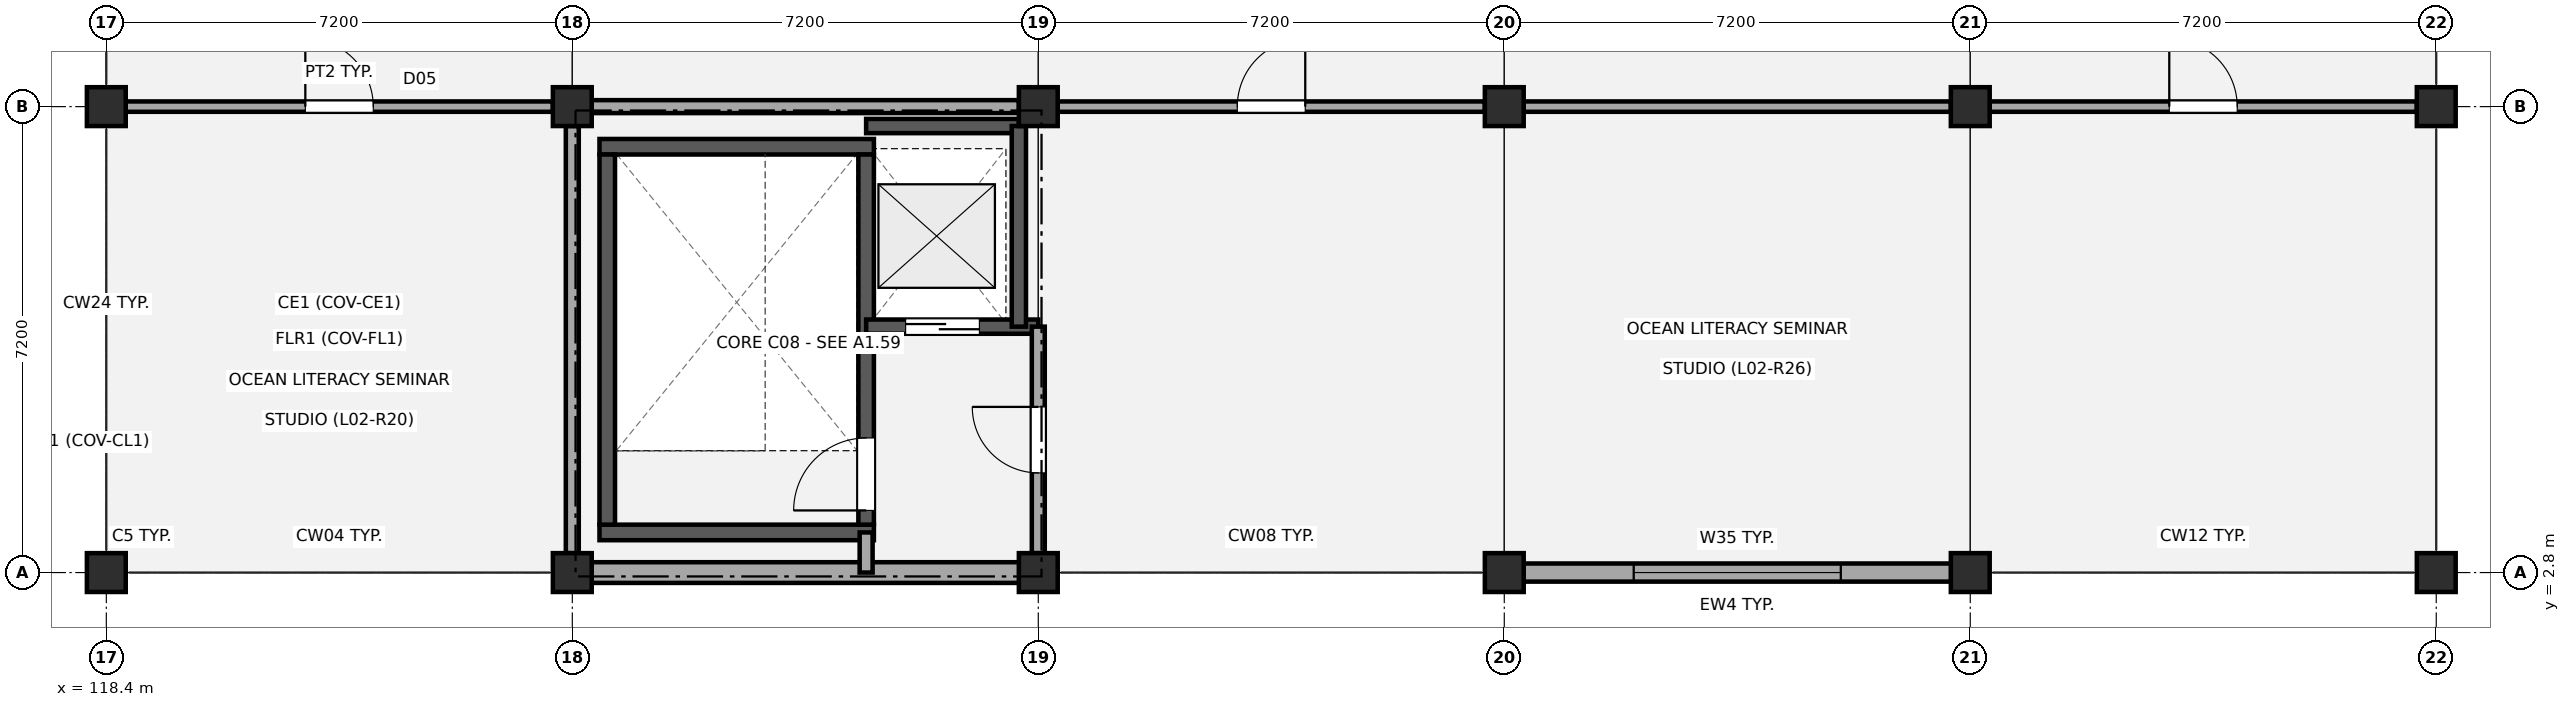
"""IFC4 building model, lengths in metres.
Left out: names, types, materials, properties, quantities, classifications, styles, units other than length and angle.
Written with IfcOpenShell. Run it as: python <this file> out.ifc"""

import sys

from ifc_helpers import new_model, si_unit, direction, frame, frame_2d, origin, origin_2d, place, context, subcontext, project, spatial, rectangle, extrude, element, fill, save


model = new_model("IFC4")
c1 = context("Model", 3, precision=1e-05, world=origin(), true_north=direction((0.0, 1.0)))
c2 = subcontext(c1, "Body", "Model", "MODEL_VIEW")
j1 = project(units=[si_unit("LENGTHUNIT", "METRE"), si_unit("PLANEANGLEUNIT", "RADIAN")], contexts=[c1])
p1 = place(None, origin())
s1 = spatial("IfcSite", under=j1, at=p1, CompositionType="ELEMENT")
p2 = place(p1, origin())
s2 = spatial("IfcBuilding", under=s1, at=p2, CompositionType="ELEMENT")
p3 = place(p2, frame((0.0, 0.0, 9.18)))
s3 = spatial("IfcBuildingStorey", under=s2, at=p3, CompositionType="ELEMENT", Elevation=9.18)
for number, where, z_axis, x_axis in (
    (1, (118.4, 2.8, 0.0), (0.0, 0.0, 1.0), (1.0, 0.0, 0.0)),
    (2, (118.4, 10.0, 0.0), (0.0, 0.0, 1.0), (1.0, 0.0, 0.0)),
    (3, (125.6, 2.8, 0.0), (0.0, 0.0, 1.0), (1.0, 0.0, 0.0)),
    (4, (125.6, 10.0, 0.0), (0.0, 0.0, 1.0), (1.0, 0.0, 0.0)),
    (5, (132.8, 2.8, 0.0), (0.0, 0.0, 1.0), (1.0, 0.0, 0.0)),
    (6, (132.8, 10.0, 0.0), (0.0, 0.0, 1.0), (1.0, 0.0, 0.0)),
    (7, (140.0, 2.8, 0.0), (0.0, 0.0, 1.0), (1.0, 0.0, 0.0)),
    (8, (140.0, 10.0, 0.0), (0.0, 0.0, 1.0), (1.0, 0.0, 0.0)),
    (9, (147.2, 2.8, 0.0), (0.0, 0.0, 1.0), (1.0, 0.0, 0.0)),
    (10, (147.2, 10.0, 0.0), (0.0, 0.0, 1.0), (1.0, 0.0, 0.0)),
    (11, (154.4, 2.8, 0.0), (0.0, 0.0, 1.0), (1.0, 0.0, 0.0)),
    (12, (154.4, 10.0, 0.0), (0.0, 0.0, 1.0), (1.0, 0.0, 0.0)),
):
    element("IfcColumn", number, at=place(p3, frame(where, z_axis=z_axis, x_axis=x_axis)), inside=s3, PredefinedType="COLUMN", context=c2, shape_type="SweptSolid", body=[
        extrude(rectangle(XDim=0.6, YDim=0.6, at=origin_2d()), origin(), (0.0, 0.0, 1.0), 4.32),
    ])
p4 = place(p3, frame((132.505, 2.8, 0.0), z_axis=(0.0, 0.0, 1.0), x_axis=(-1.0, 0.0, 0.0)))
e13 = element("IfcWall", 13, at=p4, inside=s3, PredefinedType="STANDARD", context=c2, shape_type="SweptSolid", body=[
    extrude(rectangle(XDim=6.61, YDim=0.32, at=frame_2d((3.305, 0.0))), origin(), (0.0, 0.0, 1.0), 3.52),
])
p5 = place(p3, frame((146.905, 2.8, 0.0), z_axis=(0.0, 0.0, 1.0), x_axis=(-1.0, 0.0, 0.0)))
e14 = element("IfcWall", 14, at=p5, inside=s3, PredefinedType="STANDARD", context=c2, shape_type="SweptSolid", body=[
    extrude(rectangle(XDim=6.61, YDim=0.28, at=frame_2d((3.305, 0.0))), origin(), (0.0, 0.0, 1.0), 3.52),
])
p6 = place(p5, frame((1.705, 0.0, 0.95)))
e15 = element("IfcOpeningElement", 15, at=p6, cuts=e14, PredefinedType="OPENING", context=c2, shape_type="SweptSolid", body=[
    extrude(rectangle(XDim=3.2, YDim=1.5, at=frame_2d((1.6, 0.75))), frame((0.0, 0.15, 0.0), z_axis=(0.0, -1.0, 0.0), x_axis=(1.0, 0.0, 0.0)), (0.0, 0.0, 1.0), 0.3),
])
for number, where, z_axis, x_axis in (
    (16, (126.02, 3.42, 0.0), (0.0, 0.0, 1.0), (1.0, 0.0, 0.0)),
    (17, (126.02, 9.38, 0.0), (0.0, 0.0, 1.0), (1.0, 0.0, 0.0)),
):
    element("IfcWall", number, at=place(p3, frame(where, z_axis=z_axis, x_axis=x_axis)), inside=s3, PredefinedType="SHEAR", context=c2, shape_type="SweptSolid", body=[
        extrude(rectangle(XDim=4.24, YDim=0.24, at=frame_2d((2.12, 0.0))), origin(), (0.0, 0.0, 1.0), 4.08),
    ])
p7 = place(p3, frame((126.14, 3.54, 0.0), z_axis=(0.0, 0.0, 1.0), x_axis=(0.0, 1.0, 0.0)))
e18 = element("IfcWall", 18, at=p7, inside=s3, PredefinedType="SHEAR", context=c2, shape_type="SweptSolid", body=[
    extrude(rectangle(XDim=5.72, YDim=0.24, at=frame_2d((2.86, 0.0))), origin(), (0.0, 0.0, 1.0), 4.08),
])
p8 = place(p3, frame((130.14, 3.54, 0.0), z_axis=(0.0, 0.0, 1.0), x_axis=(0.0, 1.0, 0.0)))
e19 = element("IfcWall", 19, at=p8, inside=s3, PredefinedType="SHEAR", context=c2, shape_type="SweptSolid", body=[
    extrude(rectangle(XDim=5.72, YDim=0.24, at=frame_2d((2.86, 0.0))), origin(), (0.0, 0.0, 1.0), 4.08),
])
p9 = place(p8, frame((0.22, 0.0, 0.0)))
e20 = element("IfcOpeningElement", 20, at=p9, cuts=e19, PredefinedType="OPENING", context=c2, shape_type="SweptSolid", body=[
    extrude(rectangle(XDim=1.12, YDim=2.15, at=frame_2d((0.56, 1.075))), frame((0.0, 0.13, 0.0), z_axis=(0.0, -1.0, 0.0), x_axis=(1.0, 0.0, 0.0)), (0.0, 0.0, 1.0), 0.26),
])
p10 = place(p3, frame((130.14, 6.6, 0.0), z_axis=(0.0, 0.0, 1.0), x_axis=(1.0, 0.0, 0.0)))
e21 = element("IfcWall", 21, at=p10, inside=s3, PredefinedType="SHEAR", context=c2, shape_type="SweptSolid", body=[
    extrude(rectangle(XDim=2.66, YDim=0.22, at=frame_2d((1.33, 0.0))), origin(), (0.0, 0.0, 1.0), 4.08),
])
p11 = place(p10, frame((0.61, 0.0, 0.0)))
e22 = element("IfcOpeningElement", 22, at=p11, cuts=e21, PredefinedType="OPENING", context=c2, shape_type="SweptSolid", body=[
    extrude(rectangle(XDim=1.14, YDim=2.15, at=frame_2d((0.57, 1.075))), frame((0.0, 0.12, 0.0), z_axis=(0.0, -1.0, 0.0), x_axis=(1.0, 0.0, 0.0)), (0.0, 0.0, 1.0), 0.24),
])
p12 = place(p3, frame((130.14, 9.7, 0.0), z_axis=(0.0, 0.0, 1.0), x_axis=(1.0, 0.0, 0.0)))
e23 = element("IfcWall", 23, at=p12, inside=s3, PredefinedType="SHEAR", context=c2, shape_type="SweptSolid", body=[
    extrude(rectangle(XDim=2.36, YDim=0.22, at=frame_2d((1.18, 0.0))), origin(), (0.0, 0.0, 1.0), 4.08),
])
p13 = place(p3, frame((132.5, 6.6, 0.0), z_axis=(0.0, 0.0, 1.0), x_axis=(0.0, 1.0, 0.0)))
e24 = element("IfcWall", 24, at=p13, inside=s3, PredefinedType="SHEAR", context=c2, shape_type="SweptSolid", body=[
    extrude(rectangle(XDim=3.1, YDim=0.22, at=frame_2d((1.55, 0.0))), origin(), (0.0, 0.0, 1.0), 4.08),
])
p14 = place(p3, frame((130.14, 2.8, 0.0), z_axis=(0.0, 0.0, 1.0), x_axis=(0.0, 1.0, 0.0)))
e25 = element("IfcWall", 25, at=p14, inside=s3, PredefinedType="PARTITIONING", context=c2, shape_type="SweptSolid", body=[
    extrude(rectangle(XDim=0.62, YDim=0.2, at=frame_2d((0.31, 0.0))), origin(), (0.0, 0.0, 1.0), 3.52),
])
p15 = place(p3, frame((125.6, 3.1, 0.0), z_axis=(0.0, 0.0, 1.0), x_axis=(0.0, 1.0, 0.0)))
e26 = element("IfcWall", 26, at=p15, inside=s3, PredefinedType="PARTITIONING", context=c2, shape_type="SweptSolid", body=[
    extrude(rectangle(XDim=6.6, YDim=0.2, at=frame_2d((3.3, 0.0))), origin(), (0.0, 0.0, 1.0), 3.42),
])
p16 = place(p3, frame((132.8, 3.1, 0.0), z_axis=(0.0, 0.0, 1.0), x_axis=(0.0, 1.0, 0.0)))
e27 = element("IfcWall", 27, at=p16, inside=s3, PredefinedType="PARTITIONING", context=c2, shape_type="SweptSolid", body=[
    extrude(rectangle(XDim=3.5, YDim=0.2, at=frame_2d((1.75, 0.0))), origin(), (0.0, 0.0, 1.0), 3.42),
])
p17 = place(p16, frame((1.24, 0.0, 0.0)))
e28 = element("IfcOpeningElement", 28, at=p17, cuts=e27, PredefinedType="OPENING", context=c2, shape_type="SweptSolid", body=[
    extrude(rectangle(XDim=1.02, YDim=2.15, at=frame_2d((0.51, 1.075))), frame((0.0, 0.11, 0.0), z_axis=(0.0, -1.0, 0.0), x_axis=(1.0, 0.0, 0.0)), (0.0, 0.0, 1.0), 0.22),
])
p18 = place(p3, frame((125.9, 10.0, 0.0), z_axis=(0.0, 0.0, 1.0), x_axis=(1.0, 0.0, 0.0)))
e29 = element("IfcWall", 29, at=p18, inside=s3, PredefinedType="PARTITIONING", context=c2, shape_type="SweptSolid", body=[
    extrude(rectangle(XDim=6.6, YDim=0.2, at=frame_2d((3.3, 0.0))), origin(), (0.0, 0.0, 1.0), 3.42),
])
p19 = place(p3, frame((118.7, 10.0, 0.0), z_axis=(0.0, 0.0, 1.0), x_axis=(1.0, 0.0, 0.0)))
e30 = element("IfcWall", 30, at=p19, inside=s3, PredefinedType="PARTITIONING", context=c2, shape_type="SweptSolid", body=[
    extrude(rectangle(XDim=6.6, YDim=0.16, at=frame_2d((3.3, 0.0))), origin(), (0.0, 0.0, 1.0), 3.47),
])
p20 = place(p19, frame((2.775, 0.0, 0.0)))
e31 = element("IfcOpeningElement", 31, at=p20, cuts=e30, PredefinedType="OPENING", context=c2, shape_type="SweptSolid", body=[
    extrude(rectangle(XDim=1.05, YDim=2.14, at=frame_2d((0.525, 1.07))), frame((0.0, 0.09, 0.0), z_axis=(0.0, -1.0, 0.0), x_axis=(1.0, 0.0, 0.0)), (0.0, 0.0, 1.0), 0.18),
])
p21 = place(p3, frame((133.1, 10.0, 0.0), z_axis=(0.0, 0.0, 1.0), x_axis=(1.0, 0.0, 0.0)))
e32 = element("IfcWall", 32, at=p21, inside=s3, PredefinedType="PARTITIONING", context=c2, shape_type="SweptSolid", body=[
    extrude(rectangle(XDim=6.6, YDim=0.16, at=frame_2d((3.3, 0.0))), origin(), (0.0, 0.0, 1.0), 3.47),
])
p22 = place(p21, frame((2.775, 0.0, 0.0)))
e33 = element("IfcOpeningElement", 33, at=p22, cuts=e32, PredefinedType="OPENING", context=c2, shape_type="SweptSolid", body=[
    extrude(rectangle(XDim=1.05, YDim=2.14, at=frame_2d((0.525, 1.07))), frame((0.0, 0.09, 0.0), z_axis=(0.0, -1.0, 0.0), x_axis=(1.0, 0.0, 0.0)), (0.0, 0.0, 1.0), 0.18),
])
p23 = place(p3, frame((140.3, 10.0, 0.0), z_axis=(0.0, 0.0, 1.0), x_axis=(1.0, 0.0, 0.0)))
e34 = element("IfcWall", 34, at=p23, inside=s3, PredefinedType="PARTITIONING", context=c2, shape_type="SweptSolid", body=[
    extrude(rectangle(XDim=6.6, YDim=0.16, at=frame_2d((3.3, 0.0))), origin(), (0.0, 0.0, 1.0), 3.42),
])
p24 = place(p3, frame((147.5, 10.0, 0.0), z_axis=(0.0, 0.0, 1.0), x_axis=(1.0, 0.0, 0.0)))
e35 = element("IfcWall", 35, at=p24, inside=s3, PredefinedType="PARTITIONING", context=c2, shape_type="SweptSolid", body=[
    extrude(rectangle(XDim=6.6, YDim=0.16, at=frame_2d((3.3, 0.0))), origin(), (0.0, 0.0, 1.0), 3.47),
])
p25 = place(p24, frame((2.775, 0.0, 0.0)))
e36 = element("IfcOpeningElement", 36, at=p25, cuts=e35, PredefinedType="OPENING", context=c2, shape_type="SweptSolid", body=[
    extrude(rectangle(XDim=1.05, YDim=2.14, at=frame_2d((0.525, 1.07))), frame((0.0, 0.09, 0.0), z_axis=(0.0, -1.0, 0.0), x_axis=(1.0, 0.0, 0.0)), (0.0, 0.0, 1.0), 0.18),
])
p26 = place(p6, origin())
e37 = element("IfcWindow", 37, at=p26, inside=s3, PartitioningType="SINGLE_PANEL", PredefinedType="WINDOW", context=c2, shape_type="SweptSolid", body=[
    extrude(rectangle(XDim=3.2, YDim=1.5, at=frame_2d((1.6, 0.75))), frame((0.0, 0.03, 0.0), z_axis=(0.0, -1.0, 0.0), x_axis=(1.0, 0.0, 0.0)), (0.0, 0.0, 1.0), 0.06),
])
fill(e15, e37)
p27 = place(p9, origin())
e38 = element("IfcDoor", 38, at=p27, inside=s3, OperationType="SINGLE_SWING_LEFT", PredefinedType="DOOR", context=c2, shape_type="SweptSolid", body=[
    extrude(rectangle(XDim=1.12, YDim=2.15, at=frame_2d((0.56, 1.075))), frame((0.0, 0.025, 0.0), z_axis=(0.0, -1.0, 0.0), x_axis=(1.0, 0.0, 0.0)), (0.0, 0.0, 1.0), 0.05),
])
fill(e20, e38)
p28 = place(p11, origin())
e39 = element("IfcDoor", 39, at=p28, inside=s3, OperationType="SLIDING_TO_LEFT", PredefinedType="DOOR", context=c2, shape_type="SweptSolid", body=[
    extrude(rectangle(XDim=1.14, YDim=2.15, at=frame_2d((0.57, 1.075))), frame((0.0, 0.025, 0.0), z_axis=(0.0, -1.0, 0.0), x_axis=(1.0, 0.0, 0.0)), (0.0, 0.0, 1.0), 0.05),
])
fill(e22, e39)
p29 = place(p17, origin())
e40 = element("IfcDoor", 40, at=p29, inside=s3, OperationType="SINGLE_SWING_RIGHT", PredefinedType="DOOR", context=c2, shape_type="SweptSolid", body=[
    extrude(rectangle(XDim=1.02, YDim=2.15, at=frame_2d((0.51, 1.075))), frame((0.0, 0.025, 0.0), z_axis=(0.0, -1.0, 0.0), x_axis=(1.0, 0.0, 0.0)), (0.0, 0.0, 1.0), 0.05),
])
fill(e28, e40)
p30 = place(p20, origin())
e41 = element("IfcDoor", 41, at=p30, inside=s3, OperationType="SINGLE_SWING_LEFT", PredefinedType="DOOR", context=c2, shape_type="SweptSolid", body=[
    extrude(rectangle(XDim=1.05, YDim=2.14, at=frame_2d((0.525, 1.07))), frame((0.0, 0.025, 0.0), z_axis=(0.0, -1.0, 0.0), x_axis=(1.0, 0.0, 0.0)), (0.0, 0.0, 1.0), 0.05),
])
fill(e31, e41)
p31 = place(p22, origin())
e42 = element("IfcDoor", 42, at=p31, inside=s3, OperationType="SINGLE_SWING_RIGHT", PredefinedType="DOOR", context=c2, shape_type="SweptSolid", body=[
    extrude(rectangle(XDim=1.05, YDim=2.14, at=frame_2d((0.525, 1.07))), frame((0.0, 0.025, 0.0), z_axis=(0.0, -1.0, 0.0), x_axis=(1.0, 0.0, 0.0)), (0.0, 0.0, 1.0), 0.05),
])
fill(e33, e42)
p32 = place(p25, origin())
e43 = element("IfcDoor", 43, at=p32, inside=s3, OperationType="SINGLE_SWING_LEFT", PredefinedType="DOOR", context=c2, shape_type="SweptSolid", body=[
    extrude(rectangle(XDim=1.05, YDim=2.14, at=frame_2d((0.525, 1.07))), frame((0.0, 0.025, 0.0), z_axis=(0.0, -1.0, 0.0), x_axis=(1.0, 0.0, 0.0)), (0.0, 0.0, 1.0), 0.05),
])
fill(e36, e43)
save(model, sys.argv[1])
